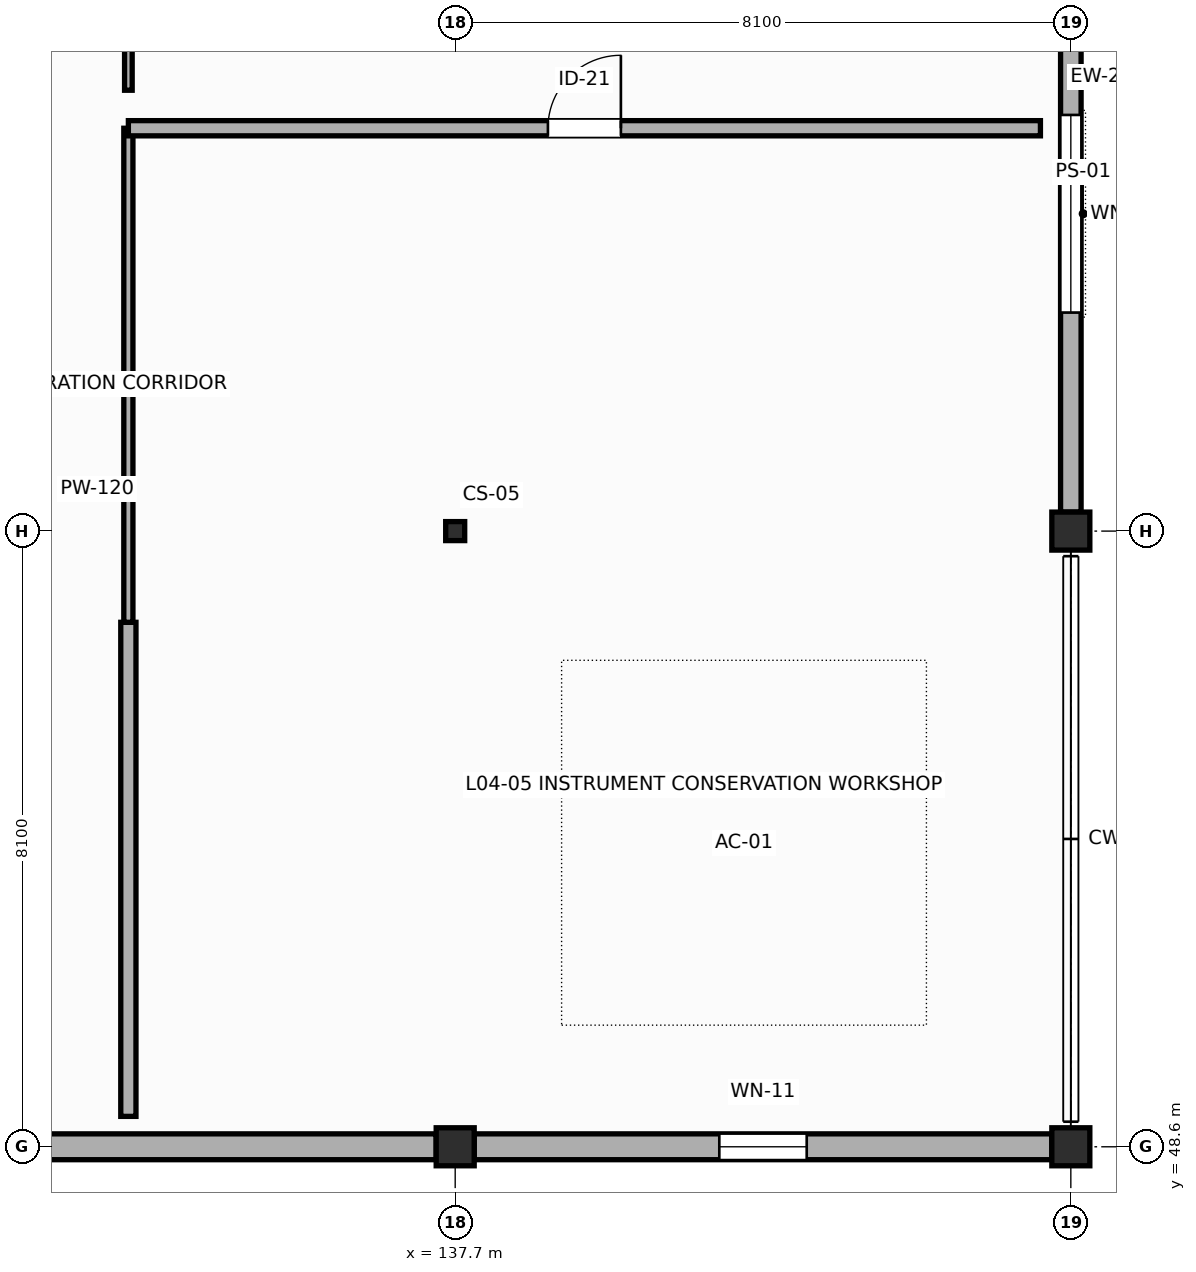
"""IFC4 building model, lengths in metres.
Left out: names, types, materials, properties, quantities, classifications, styles, units other than length and angle.
Written with IfcOpenShell. Run it as: python <this file> out.ifc"""

import sys

from ifc_helpers import new_model, si_unit, direction, frame, frame_2d, origin, origin_2d, place, context, subcontext, project, spatial, rectangle, hollow_rectangle, extrude, element, fill, save


model = new_model("IFC4")
c1 = context("Model", 3, precision=1e-05, world=origin(), true_north=direction((0.0, 1.0)))
c2 = subcontext(c1, "Body", "Model", "MODEL_VIEW")
j1 = project(units=[si_unit("LENGTHUNIT", "METRE"), si_unit("PLANEANGLEUNIT", "RADIAN")], contexts=[c1])
p1 = place(None, origin())
s1 = spatial("IfcSite", under=j1, at=p1, CompositionType="ELEMENT")
p2 = place(p1, origin())
s2 = spatial("IfcBuilding", under=s1, at=p2, CompositionType="ELEMENT")
p3 = place(p2, frame((0.0, 0.0, 19.2)))
s3 = spatial("IfcBuildingStorey", under=s2, at=p3, CompositionType="ELEMENT", Elevation=19.2)
p4 = place(p3, frame((137.7, 48.6, 0.0), z_axis=(0.0, 0.0, 1.0), x_axis=(1.0, 0.0, 0.0)))
e1 = element("IfcColumn", 1, at=p4, inside=s3, PredefinedType="COLUMN", context=c2, shape_type="SweptSolid", body=[
    extrude(rectangle(XDim=0.5, YDim=0.5, at=origin_2d()), origin(), (0.0, 0.0, 1.0), 4.2),
])
p5 = place(p3, frame((137.7, 56.7, 0.0), z_axis=(0.0, 0.0, 1.0), x_axis=(1.0, 0.0, 0.0)))
e2 = element("IfcColumn", 2, at=p5, inside=s3, PredefinedType="COLUMN", context=c2, shape_type="SweptSolid", body=[
    extrude(hollow_rectangle(XDim=0.25, YDim=0.25, WallThickness=0.012, InnerFilletRadius=0.012, OuterFilletRadius=0.025, at=origin_2d()), origin(), (0.0, 0.0, 1.0), 4.2),
])
for number, where, z_axis, x_axis in (
    (3, (145.8, 48.6, 0.0), (0.0, 0.0, 1.0), (1.0, 0.0, 0.0)),
    (4, (145.8, 56.7, 0.0), (0.0, 0.0, 1.0), (1.0, 0.0, 0.0)),
):
    element("IfcColumn", number, at=place(p3, frame(where, z_axis=z_axis, x_axis=x_axis)), inside=s3, PredefinedType="COLUMN", context=c2, shape_type="SweptSolid", body=[
        extrude(rectangle(XDim=0.5, YDim=0.5, at=origin_2d()), origin(), (0.0, 0.0, 1.0), 4.2),
    ])
p6 = place(p3, frame((145.8, 64.8, 0.0), z_axis=(0.0, 0.0, 1.0), x_axis=(0.0, -1.0, 0.0)))
e5 = element("IfcWall", 5, at=p6, inside=s3, PredefinedType="SOLIDWALL", context=c2, shape_type="SweptSolid", body=[
    extrude(rectangle(XDim=7.85, YDim=0.27, at=frame_2d((3.925, 0.0))), origin(), (0.0, 0.0, 1.0), 3.597),
])
p7 = place(p6, frame((2.625, 0.0, 0.9)))
e6 = element("IfcOpeningElement", 6, at=p7, cuts=e5, PredefinedType="OPENING", context=c2, shape_type="SweptSolid", body=[
    extrude(rectangle(XDim=2.6, YDim=1.8, at=frame_2d((1.3, 0.9))), frame((0.0, 0.145, 0.0), z_axis=(0.0, -1.0, 0.0), x_axis=(1.0, 0.0, 0.0)), (0.0, 0.0, 1.0), 0.29),
])
p8 = place(p3, frame((129.85, 48.6, 0.0), z_axis=(0.0, 0.0, 1.0), x_axis=(1.0, 0.0, 0.0)))
e7 = element("IfcWall", 7, at=p8, inside=s3, PredefinedType="SOLIDWALL", context=c2, shape_type="SweptSolid", body=[
    extrude(rectangle(XDim=7.6, YDim=0.34, at=frame_2d((3.8, 0.0))), origin(), (0.0, 0.0, 1.0), 3.485),
])
p9 = place(p3, frame((137.95, 48.6, 0.0), z_axis=(0.0, 0.0, 1.0), x_axis=(1.0, 0.0, 0.0)))
e8 = element("IfcWall", 8, at=p9, inside=s3, PredefinedType="SOLIDWALL", context=c2, shape_type="SweptSolid", body=[
    extrude(rectangle(XDim=7.6, YDim=0.34, at=frame_2d((3.8, 0.0))), origin(), (0.0, 0.0, 1.0), 3.537),
])
p10 = place(p9, frame((3.225, 0.0, 0.9)))
e9 = element("IfcOpeningElement", 9, at=p10, cuts=e8, PredefinedType="OPENING", context=c2, shape_type="SweptSolid", body=[
    extrude(rectangle(XDim=1.15, YDim=1.7, at=frame_2d((0.575, 0.85))), frame((0.0, 0.18, 0.0), z_axis=(0.0, -1.0, 0.0), x_axis=(1.0, 0.0, 0.0)), (0.0, 0.0, 1.0), 0.36),
])
p11 = place(p3, frame((133.4, 49.0, 0.0), z_axis=(0.0, 0.0, 1.0), x_axis=(0.0, 1.0, 0.0)))
e10 = element("IfcWall", 10, at=p11, inside=s3, PredefinedType="PARTITIONING", context=c2, shape_type="SweptSolid", body=[
    extrude(rectangle(XDim=6.5, YDim=0.2, at=frame_2d((3.25, 0.0))), origin(), (0.0, 0.0, 1.0), 3.92),
])
p12 = place(p3, frame((133.4, 55.5, 0.0), z_axis=(0.0, 0.0, 1.0), x_axis=(0.0, 1.0, 0.0)))
e11 = element("IfcWall", 11, at=p12, inside=s3, PredefinedType="PARTITIONING", context=c2, shape_type="SweptSolid", body=[
    extrude(rectangle(XDim=6.5, YDim=0.12, at=frame_2d((3.25, 0.0))), origin(), (0.0, 0.0, 1.0), 3.92),
])
p13 = place(p3, frame((133.4, 62.0, 0.0), z_axis=(0.0, 0.0, 1.0), x_axis=(1.0, 0.0, 0.0)))
e12 = element("IfcWall", 12, at=p13, inside=s3, PredefinedType="PARTITIONING", context=c2, shape_type="SweptSolid", body=[
    extrude(rectangle(XDim=12.0, YDim=0.2, at=frame_2d((6.0, 0.0))), origin(), (0.0, 0.0, 1.0), 3.92),
])
p14 = place(p13, frame((5.52, 0.0, 0.0)))
e13 = element("IfcOpeningElement", 13, at=p14, cuts=e12, PredefinedType="OPENING", context=c2, shape_type="SweptSolid", body=[
    extrude(rectangle(XDim=0.96, YDim=2.16, at=frame_2d((0.48, 1.08))), frame((0.0, 0.11, 0.0), z_axis=(0.0, -1.0, 0.0), x_axis=(1.0, 0.0, 0.0)), (0.0, 0.0, 1.0), 0.22),
])
p15 = place(p3, frame((133.4, 62.5, 0.0), z_axis=(0.0, 0.0, 1.0), x_axis=(0.0, 1.0, 0.0)))
e14 = element("IfcWall", 14, at=p15, inside=s3, PredefinedType="PARTITIONING", context=c2, shape_type="SweptSolid", body=[
    extrude(rectangle(XDim=11.5, YDim=0.1, at=frame_2d((5.75, 0.0))), origin(), (0.0, 0.0, 1.0), 3.92),
])
p16 = place(p7, origin())
e15 = element("IfcWindow", 15, at=p16, inside=s3, PartitioningType="SINGLE_PANEL", PredefinedType="WINDOW", context=c2, shape_type="SweptSolid", body=[
    extrude(rectangle(XDim=2.6, YDim=1.8, at=frame_2d((1.3, 0.9))), frame((0.0, 0.03, 0.0), z_axis=(0.0, -1.0, 0.0), x_axis=(1.0, 0.0, 0.0)), (0.0, 0.0, 1.0), 0.06),
])
fill(e6, e15)
p17 = place(p10, origin())
e16 = element("IfcWindow", 16, at=p17, inside=s3, PartitioningType="SINGLE_PANEL", PredefinedType="WINDOW", context=c2, shape_type="SweptSolid", body=[
    extrude(rectangle(XDim=1.15, YDim=1.7, at=frame_2d((0.575, 0.85))), frame((0.0, 0.03, 0.0), z_axis=(0.0, -1.0, 0.0), x_axis=(1.0, 0.0, 0.0)), (0.0, 0.0, 1.0), 0.06),
])
fill(e9, e16)
p18 = place(p14, origin())
e17 = element("IfcDoor", 17, at=p18, inside=s3, OperationType="SINGLE_SWING_RIGHT", PredefinedType="DOOR", context=c2, shape_type="SweptSolid", body=[
    extrude(rectangle(XDim=0.96, YDim=2.16, at=frame_2d((0.48, 1.08))), frame((0.0, 0.025, 0.0), z_axis=(0.0, -1.0, 0.0), x_axis=(1.0, 0.0, 0.0)), (0.0, 0.0, 1.0), 0.05),
])
fill(e13, e17)
save(model, sys.argv[1])
